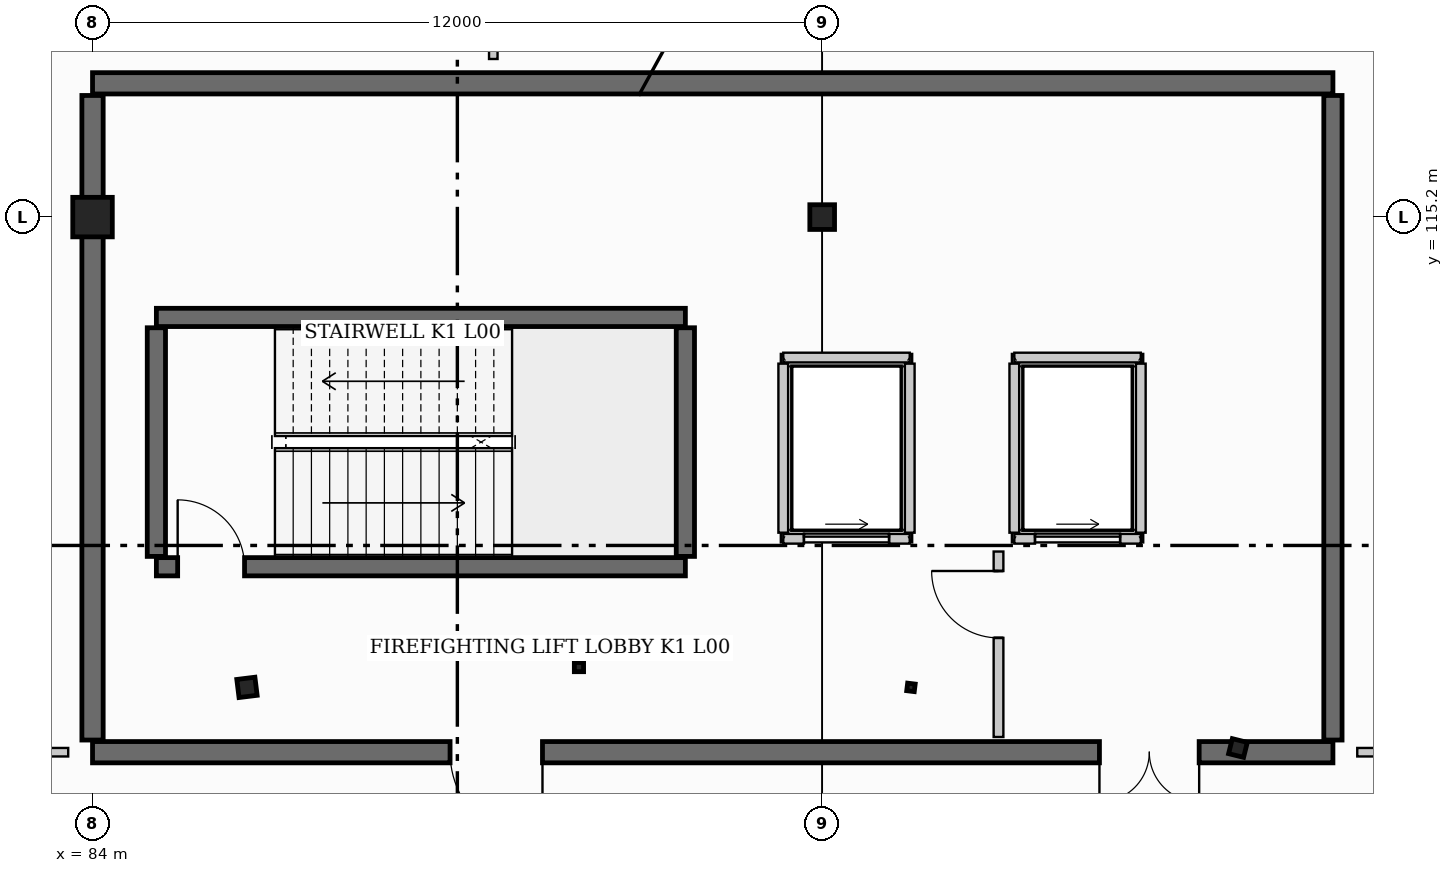
"""IFC4 building model, lengths in metres.
Left out: names, types, materials, properties, quantities, classifications, styles, units other than length and angle.
Written with IfcOpenShell. Run it as: python <this file> out.ifc"""

import sys

from ifc_helpers import new_model, si_unit, direction, frame, frame_2d, origin, origin_2d, place, context, subcontext, project, spatial, rectangle, hollow_rectangle, hollow_circle, i_section, extrude, element, fill, save


model = new_model("IFC4")
c1 = context("Model", 3, precision=1e-05, world=origin(), true_north=direction((0.0, 1.0)))
c2 = subcontext(c1, "Body", "Model", "MODEL_VIEW")
j1 = project(units=[si_unit("LENGTHUNIT", "METRE"), si_unit("PLANEANGLEUNIT", "RADIAN")], contexts=[c1])
p1 = place(None, origin())
s1 = spatial("IfcSite", under=j1, at=p1, CompositionType="ELEMENT")
p2 = place(p1, origin())
s2 = spatial("IfcBuilding", under=s1, at=p2, CompositionType="ELEMENT")
p3 = place(p2, origin())
s3 = spatial("IfcBuildingStorey", under=s2, at=p3, CompositionType="ELEMENT", Elevation=0.0)
p4 = place(p3, frame((84.0, 115.2, 0.0), z_axis=(0.0, 0.0, 1.0), x_axis=(0.0, 1.0, 0.0)))
e1 = element("IfcColumn", 1, at=p4, inside=s3, PredefinedType="COLUMN", context=c2, shape_type="SweptSolid", body=[
    extrude(rectangle(XDim=0.65, YDim=0.65, at=origin_2d()), origin(), (0.0, 0.0, 1.0), 4.8),
])
p5 = place(p3, frame((96.0, 115.2, 0.0), z_axis=(0.0, 0.0, 1.0), x_axis=(1.0, 0.0, 0.0)))
e2 = element("IfcColumn", 2, at=p5, inside=s3, PredefinedType="COLUMN", context=c2, shape_type="SweptSolid", body=[
    extrude(hollow_circle(Radius=0.203, WallThickness=0.016, at=origin_2d()), origin(), (0.0, 0.0, 1.0), 4.8),
])
p6 = place(p3, frame((86.54, 107.466, 0.0), z_axis=(0.0, 0.0, 1.0), x_axis=(-0.121869343405, 0.992546151641, 0.0)))
e3 = element("IfcColumn", 3, at=p6, inside=s3, PredefinedType="COLUMN", context=c2, shape_type="SweptSolid", body=[
    extrude(hollow_rectangle(XDim=0.3, YDim=0.3, WallThickness=0.012, at=origin_2d()), origin(), (0.0, 0.0, 1.0), 4.8),
])
p7 = place(p3, frame((92.0, 107.8, 0.0), z_axis=(0.0, 0.0, 1.0), x_axis=(0.0, 1.0, 0.0)))
e4 = element("IfcColumn", 4, at=p7, inside=s3, PredefinedType="COLUMN", context=c2, shape_type="SweptSolid", body=[
    extrude(i_section(OverallWidth=0.152, OverallDepth=0.152, WebThickness=0.006, FlangeThickness=0.007, at=origin_2d()), origin(), (0.0, 0.0, 1.0), 4.8),
])
p8 = place(p3, frame((97.46, 107.466, 0.0), z_axis=(0.0, 0.0, 1.0), x_axis=(0.121869343405, 0.992546151641, 0.0)))
e5 = element("IfcColumn", 5, at=p8, inside=s3, PredefinedType="COLUMN", context=c2, shape_type="SweptSolid", body=[
    extrude(hollow_rectangle(XDim=0.125, YDim=0.125, WallThickness=0.006, at=origin_2d()), origin(), (0.0, 0.0, 1.0), 4.8),
])
p9 = place(p3, frame((102.838, 106.469, 0.0), z_axis=(0.0, 0.0, 1.0), x_axis=(0.2419218956, 0.970295726276, 0.0)))
e6 = element("IfcColumn", 6, at=p9, inside=s3, PredefinedType="COLUMN", context=c2, shape_type="SweptSolid", body=[
    extrude(i_section(OverallWidth=0.254, OverallDepth=0.254, WebThickness=0.009, FlangeThickness=0.014, at=origin_2d()), origin(), (0.0, 0.0, 1.0), 4.8),
])
p10 = place(p3, frame((84.0, 117.4, 0.0), z_axis=(0.0, 0.0, 1.0), x_axis=(1.0, 0.0, 0.0)))
e7 = element("IfcWall", 7, at=p10, inside=s3, PredefinedType="SHEAR", context=c2, shape_type="SweptSolid", body=[
    extrude(rectangle(XDim=20.4, YDim=0.35, at=frame_2d((10.2, 0.0))), origin(), (0.0, 0.0, 1.0), 4.8),
])
p11 = place(p3, frame((104.4, 106.4, 0.0), z_axis=(0.0, 0.0, 1.0), x_axis=(-1.0, 0.0, 0.0)))
e8 = element("IfcWall", 8, at=p11, inside=s3, PredefinedType="SHEAR", context=c2, shape_type="SweptSolid", body=[
    extrude(rectangle(XDim=20.4, YDim=0.35, at=frame_2d((10.2, 0.0))), origin(), (0.0, 0.0, 1.0), 4.8),
])
p12 = place(p11, frame((2.2, 0.0, 0.0)))
e9 = element("IfcOpeningElement", 9, at=p12, cuts=e8, PredefinedType="OPENING", context=c2, shape_type="SweptSolid", body=[
    extrude(rectangle(XDim=1.64, YDim=2.2, at=frame_2d((0.82, 1.1))), frame((0.0, 0.185, 0.0), z_axis=(0.0, -1.0, 0.0), x_axis=(1.0, 0.0, 0.0)), (0.0, 0.0, 1.0), 0.37),
])
p13 = place(p11, frame((13.0, 0.0, 0.0)))
e10 = element("IfcOpeningElement", 10, at=p13, cuts=e8, PredefinedType="OPENING", context=c2, shape_type="SweptSolid", body=[
    extrude(rectangle(XDim=1.52, YDim=2.16, at=frame_2d((0.76, 1.08))), frame((0.0, 0.185, 0.0), z_axis=(0.0, -1.0, 0.0), x_axis=(1.0, 0.0, 0.0)), (0.0, 0.0, 1.0), 0.37),
])
p14 = place(p3, frame((84.0, 106.6, 0.0), z_axis=(0.0, 0.0, 1.0), x_axis=(0.0, 1.0, 0.0)))
e11 = element("IfcWall", 11, at=p14, inside=s3, PredefinedType="SHEAR", context=c2, shape_type="SweptSolid", body=[
    extrude(rectangle(XDim=10.6, YDim=0.35, at=frame_2d((5.3, 0.0))), origin(), (0.0, 0.0, 1.0), 4.8),
])
p15 = place(p3, frame((104.4, 117.2, 0.0), z_axis=(0.0, 0.0, 1.0), x_axis=(0.0, -1.0, 0.0)))
e12 = element("IfcWall", 12, at=p15, inside=s3, PredefinedType="SHEAR", context=c2, shape_type="SweptSolid", body=[
    extrude(rectangle(XDim=10.6, YDim=0.3, at=frame_2d((5.3, 0.0))), origin(), (0.0, 0.0, 1.0), 4.8),
])
p16 = place(p3, frame((85.05, 109.45, 0.0), z_axis=(0.0, 0.0, 1.0), x_axis=(1.0, 0.0, 0.0)))
e13 = element("IfcWall", 13, at=p16, inside=s3, PredefinedType="SHEAR", context=c2, shape_type="SweptSolid", body=[
    extrude(rectangle(XDim=8.7, YDim=0.3, at=frame_2d((4.35, 0.0))), origin(), (0.0, 0.0, 1.0), 4.8),
])
p17 = place(p16, frame((0.35, 0.0, 0.0)))
e14 = element("IfcOpeningElement", 14, at=p17, cuts=e13, PredefinedType="OPENING", context=c2, shape_type="SweptSolid", body=[
    extrude(rectangle(XDim=1.1, YDim=2.15, at=frame_2d((0.55, 1.075))), frame((0.0, 0.16, 0.0), z_axis=(0.0, -1.0, 0.0), x_axis=(1.0, 0.0, 0.0)), (0.0, 0.0, 1.0), 0.32),
])
p18 = place(p3, frame((93.75, 113.55, 0.0), z_axis=(0.0, 0.0, 1.0), x_axis=(-1.0, 0.0, 0.0)))
e15 = element("IfcWall", 15, at=p18, inside=s3, PredefinedType="SHEAR", context=c2, shape_type="SweptSolid", body=[
    extrude(rectangle(XDim=8.7, YDim=0.3, at=frame_2d((4.35, 0.0))), origin(), (0.0, 0.0, 1.0), 4.8),
])
for number, where, z_axis, x_axis in (
    (16, (85.05, 109.62, 0.0), (0.0, 0.0, 1.0), (0.0, 1.0, 0.0)),
    (17, (93.75, 109.62, 0.0), (0.0, 0.0, 1.0), (0.0, 1.0, 0.0)),
):
    element("IfcWall", number, at=place(p3, frame(where, z_axis=z_axis, x_axis=x_axis)), inside=s3, PredefinedType="SHEAR", context=c2, shape_type="SweptSolid", body=[
        extrude(rectangle(XDim=3.76, YDim=0.3, at=frame_2d((1.88, 0.0))), origin(), (0.0, 0.0, 1.0), 4.8),
    ])
p19 = place(p3, frame((95.36, 109.91, 0.0), z_axis=(0.0, 0.0, 1.0), x_axis=(1.0, 0.0, 0.0)))
e18 = element("IfcWall", 18, at=p19, inside=s3, PredefinedType="PARTITIONING", context=c2, shape_type="SweptSolid", body=[
    extrude(rectangle(XDim=2.08, YDim=0.16, at=frame_2d((1.04, 0.0))), origin(), (0.0, 0.0, 1.0), 4.445),
])
p20 = place(p19, frame((0.34, 0.0, 0.0)))
e19 = element("IfcOpeningElement", 19, at=p20, cuts=e18, PredefinedType="OPENING", context=c2, shape_type="SweptSolid", body=[
    extrude(rectangle(XDim=1.4, YDim=2.2, at=frame_2d((0.7, 1.1))), frame((0.0, 0.09, 0.0), z_axis=(0.0, -1.0, 0.0), x_axis=(1.0, 0.0, 0.0)), (0.0, 0.0, 1.0), 0.18),
])
p21 = place(p3, frame((97.44, 112.89, 0.0), z_axis=(0.0, 0.0, 1.0), x_axis=(-1.0, 0.0, 0.0)))
e20 = element("IfcWall", 20, at=p21, inside=s3, PredefinedType="PARTITIONING", context=c2, shape_type="SweptSolid", body=[
    extrude(rectangle(XDim=2.08, YDim=0.16, at=frame_2d((1.04, 0.0))), origin(), (0.0, 0.0, 1.0), 4.445),
])
for number, where, z_axis, x_axis in (
    (21, (95.36, 112.79, 0.0), (0.0, 0.0, 1.0), (0.0, -1.0, 0.0)),
    (22, (97.44, 110.01, 0.0), (0.0, 0.0, 1.0), (0.0, 1.0, 0.0)),
):
    element("IfcWall", number, at=place(p3, frame(where, z_axis=z_axis, x_axis=x_axis)), inside=s3, PredefinedType="PARTITIONING", context=c2, shape_type="SweptSolid", body=[
        extrude(rectangle(XDim=2.78, YDim=0.16, at=frame_2d((1.39, 0.0))), origin(), (0.0, 0.0, 1.0), 4.445),
    ])
p22 = place(p3, frame((99.16, 109.91, 0.0), z_axis=(0.0, 0.0, 1.0), x_axis=(1.0, 0.0, 0.0)))
e23 = element("IfcWall", 23, at=p22, inside=s3, PredefinedType="PARTITIONING", context=c2, shape_type="SweptSolid", body=[
    extrude(rectangle(XDim=2.08, YDim=0.16, at=frame_2d((1.04, 0.0))), origin(), (0.0, 0.0, 1.0), 4.445),
])
p23 = place(p22, frame((0.34, 0.0, 0.0)))
e24 = element("IfcOpeningElement", 24, at=p23, cuts=e23, PredefinedType="OPENING", context=c2, shape_type="SweptSolid", body=[
    extrude(rectangle(XDim=1.4, YDim=2.2, at=frame_2d((0.7, 1.1))), frame((0.0, 0.09, 0.0), z_axis=(0.0, -1.0, 0.0), x_axis=(1.0, 0.0, 0.0)), (0.0, 0.0, 1.0), 0.18),
])
p24 = place(p3, frame((101.24, 112.89, 0.0), z_axis=(0.0, 0.0, 1.0), x_axis=(-1.0, 0.0, 0.0)))
e25 = element("IfcWall", 25, at=p24, inside=s3, PredefinedType="PARTITIONING", context=c2, shape_type="SweptSolid", body=[
    extrude(rectangle(XDim=2.08, YDim=0.16, at=frame_2d((1.04, 0.0))), origin(), (0.0, 0.0, 1.0), 4.445),
])
for number, where, z_axis, x_axis in (
    (26, (99.16, 112.79, 0.0), (0.0, 0.0, 1.0), (0.0, -1.0, 0.0)),
    (27, (101.24, 110.01, 0.0), (0.0, 0.0, 1.0), (0.0, 1.0, 0.0)),
):
    element("IfcWall", number, at=place(p3, frame(where, z_axis=z_axis, x_axis=x_axis)), inside=s3, PredefinedType="PARTITIONING", context=c2, shape_type="SweptSolid", body=[
        extrude(rectangle(XDim=2.78, YDim=0.16, at=frame_2d((1.39, 0.0))), origin(), (0.0, 0.0, 1.0), 4.445),
    ])
p25 = place(p3, frame((98.9, 106.65, 0.0), z_axis=(0.0, 0.0, 1.0), x_axis=(0.0, 1.0, 0.0)))
e28 = element("IfcWall", 28, at=p25, inside=s3, PredefinedType="PARTITIONING", context=c2, shape_type="SweptSolid", body=[
    extrude(rectangle(XDim=3.05, YDim=0.16, at=frame_2d((1.525, 0.0))), origin(), (0.0, 0.0, 1.0), 4.445),
])
p26 = place(p25, frame((1.63, 0.0, 0.0)))
e29 = element("IfcOpeningElement", 29, at=p26, cuts=e28, PredefinedType="OPENING", context=c2, shape_type="SweptSolid", body=[
    extrude(rectangle(XDim=1.1, YDim=2.15, at=frame_2d((0.55, 1.075))), frame((0.0, 0.09, 0.0), z_axis=(0.0, -1.0, 0.0), x_axis=(1.0, 0.0, 0.0)), (0.0, 0.0, 1.0), 0.18),
])
p27 = place(p3, frame((71.25, 106.4, 0.0), z_axis=(0.0, 0.0, 1.0), x_axis=(1.0, 0.0, 0.0)))
e30 = element("IfcWall", 30, at=p27, inside=s3, PredefinedType="PARTITIONING", context=c2, shape_type="SweptSolid", body=[
    extrude(rectangle(XDim=12.35, YDim=0.14, at=frame_2d((6.175, 0.0))), origin(), (0.0, 0.0, 1.0), 4.445),
])
p28 = place(p27, frame((5.525, 0.0, 0.0)))
e31 = element("IfcOpeningElement", 31, at=p28, cuts=e30, PredefinedType="OPENING", context=c2, shape_type="SweptSolid", body=[
    extrude(rectangle(XDim=1.12, YDim=2.08, at=frame_2d((0.56, 1.04))), frame((0.0, 0.08, 0.0), z_axis=(0.0, -1.0, 0.0), x_axis=(1.0, 0.0, 0.0)), (0.0, 0.0, 1.0), 0.16),
])
p29 = place(p3, frame((90.591, 117.8, 0.0), z_axis=(0.0, 0.0, 1.0), x_axis=(0.0, 1.0, 0.0)))
e32 = element("IfcWall", 32, at=p29, inside=s3, PredefinedType="PARTITIONING", context=c2, shape_type="SweptSolid", body=[
    extrude(rectangle(XDim=7.9, YDim=0.14, at=frame_2d((3.95, 0.0))), origin(), (0.0, 0.0, 1.0), 4.126),
])
p30 = place(p3, frame((104.8, 106.4, 0.0), z_axis=(0.0, 0.0, 1.0), x_axis=(1.0, 0.0, 0.0)))
e33 = element("IfcWall", 33, at=p30, inside=s3, PredefinedType="PARTITIONING", context=c2, shape_type="SweptSolid", body=[
    extrude(rectangle(XDim=6.35, YDim=0.14, at=frame_2d((3.175, 0.0))), origin(), (0.0, 0.0, 1.0), 4.445),
])
p31 = place(p30, frame((0.32, 0.0, 0.0)))
e34 = element("IfcOpeningElement", 34, at=p31, cuts=e33, PredefinedType="OPENING", context=c2, shape_type="SweptSolid", body=[
    extrude(rectangle(XDim=1.06, YDim=2.1, at=frame_2d((0.53, 1.05))), frame((0.0, 0.08, 0.0), z_axis=(0.0, -1.0, 0.0), x_axis=(1.0, 0.0, 0.0)), (0.0, 0.0, 1.0), 0.16),
])
p32 = place(p20, origin())
e35 = element("IfcDoor", 35, at=p32, inside=s3, OperationType="SLIDING_TO_RIGHT", PredefinedType="DOOR", context=c2, shape_type="SweptSolid", body=[
    extrude(rectangle(XDim=1.4, YDim=2.2, at=frame_2d((0.7, 1.1))), frame((0.0, 0.025, 0.0), z_axis=(0.0, -1.0, 0.0), x_axis=(1.0, 0.0, 0.0)), (0.0, 0.0, 1.0), 0.05),
])
fill(e19, e35)
p33 = place(p23, origin())
e36 = element("IfcDoor", 36, at=p33, inside=s3, OperationType="SLIDING_TO_RIGHT", PredefinedType="DOOR", context=c2, shape_type="SweptSolid", body=[
    extrude(rectangle(XDim=1.4, YDim=2.2, at=frame_2d((0.7, 1.1))), frame((0.0, 0.025, 0.0), z_axis=(0.0, -1.0, 0.0), x_axis=(1.0, 0.0, 0.0)), (0.0, 0.0, 1.0), 0.05),
])
fill(e24, e36)
p34 = place(p17, origin())
e37 = element("IfcDoor", 37, at=p34, inside=s3, OperationType="SINGLE_SWING_LEFT", PredefinedType="DOOR", context=c2, shape_type="SweptSolid", body=[
    extrude(rectangle(XDim=1.1, YDim=2.15, at=frame_2d((0.55, 1.075))), frame((0.0, 0.025, 0.0), z_axis=(0.0, -1.0, 0.0), x_axis=(1.0, 0.0, 0.0)), (0.0, 0.0, 1.0), 0.05),
])
fill(e14, e37)
p35 = place(p12, origin())
e38 = element("IfcDoor", 38, at=p35, inside=s3, OperationType="DOUBLE_DOOR_SINGLE_SWING", PredefinedType="DOOR", context=c2, shape_type="SweptSolid", body=[
    extrude(rectangle(XDim=1.64, YDim=2.2, at=frame_2d((0.82, 1.1))), frame((0.0, 0.025, 0.0), z_axis=(0.0, -1.0, 0.0), x_axis=(1.0, 0.0, 0.0)), (0.0, 0.0, 1.0), 0.05),
])
fill(e9, e38)
p36 = place(p13, origin())
e39 = element("IfcDoor", 39, at=p36, inside=s3, OperationType="SINGLE_SWING_LEFT", PredefinedType="DOOR", context=c2, shape_type="SweptSolid", body=[
    extrude(rectangle(XDim=1.52, YDim=2.16, at=frame_2d((0.76, 1.08))), frame((0.0, 0.025, 0.0), z_axis=(0.0, -1.0, 0.0), x_axis=(1.0, 0.0, 0.0)), (0.0, 0.0, 1.0), 0.05),
])
fill(e10, e39)
p37 = place(p26, origin())
e40 = element("IfcDoor", 40, at=p37, inside=s3, OperationType="SINGLE_SWING_RIGHT", PredefinedType="DOOR", context=c2, shape_type="SweptSolid", body=[
    extrude(rectangle(XDim=1.1, YDim=2.15, at=frame_2d((0.55, 1.075))), frame((0.0, 0.025, 0.0), z_axis=(0.0, -1.0, 0.0), x_axis=(1.0, 0.0, 0.0)), (0.0, 0.0, 1.0), 0.05),
])
fill(e29, e40)
save(model, sys.argv[1])
